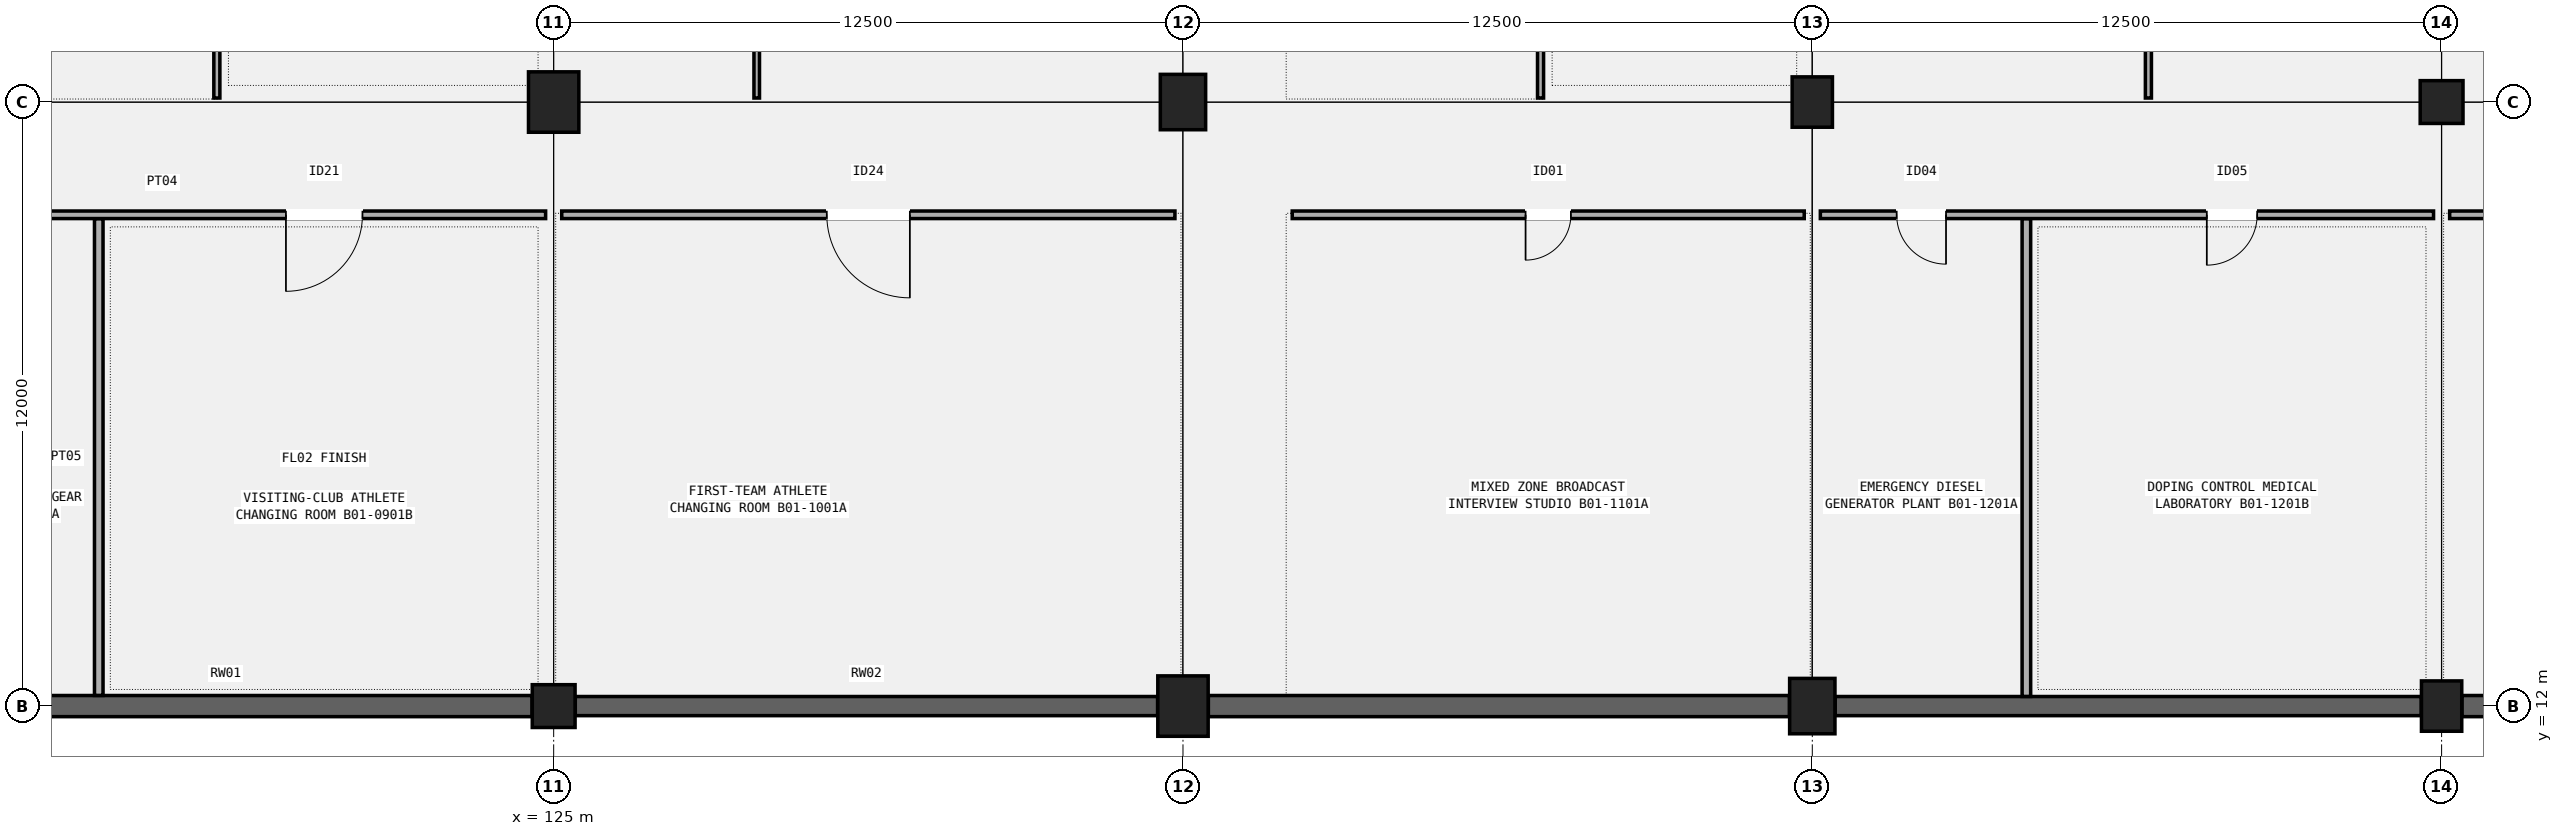
"""IFC4 building model, lengths in metres.
Left out: names, types, materials, properties, quantities, classifications, styles, units other than length and angle.
Written with IfcOpenShell. Run it as: python <this file> out.ifc"""

import sys

from ifc_helpers import new_model, si_unit, direction, frame, frame_2d, origin, origin_2d, place, context, subcontext, project, spatial, rectangle, circle, extrude, element, fill, save


model = new_model("IFC4")
c1 = context("Model", 3, precision=1e-05, world=origin(), true_north=direction((0.0, 1.0)))
c2 = subcontext(c1, "Body", "Model", "MODEL_VIEW")
j1 = project(units=[si_unit("LENGTHUNIT", "METRE"), si_unit("PLANEANGLEUNIT", "RADIAN")], contexts=[c1])
p1 = place(None, origin())
s1 = spatial("IfcSite", under=j1, at=p1, CompositionType="ELEMENT")
p2 = place(p1, origin())
s2 = spatial("IfcBuilding", under=s1, at=p2, CompositionType="ELEMENT")
p3 = place(p2, frame((0.0, 0.0, -4.8)))
s3 = spatial("IfcBuildingStorey", under=s2, at=p3, CompositionType="ELEMENT", Elevation=-4.8)
p4 = place(p3, frame((125.0, 12.0, 0.0), z_axis=(0.0, 0.0, 1.0), x_axis=(1.0, 0.0, 0.0)))
e1 = element("IfcColumn", 1, at=p4, inside=s3, PredefinedType="COLUMN", context=c2, shape_type="SweptSolid", body=[
    extrude(circle(Radius=0.425, at=origin_2d()), origin(), (0.0, 0.0, 1.0), 4.8),
])
for number, where, z_axis, x_axis in (
    (2, (125.0, 24.0, 0.0), (0.0, 0.0, 1.0), (1.0, 0.0, 0.0)),
    (3, (137.5, 12.0, 0.0), (0.0, 0.0, 1.0), (1.0, 0.0, 0.0)),
):
    element("IfcColumn", number, at=place(p3, frame(where, z_axis=z_axis, x_axis=x_axis)), inside=s3, PredefinedType="COLUMN", context=c2, shape_type="SweptSolid", body=[
        extrude(rectangle(XDim=1.0, YDim=1.2, at=origin_2d()), origin(), (0.0, 0.0, 1.0), 4.8),
    ])
for number, where, z_axis, x_axis in (
    (4, (137.5, 24.0, 0.0), (0.0, 0.0, 1.0), (1.0, 0.0, 0.0)),
    (5, (150.0, 12.0, 0.0), (0.0, 0.0, 1.0), (1.0, 0.0, 0.0)),
):
    element("IfcColumn", number, at=place(p3, frame(where, z_axis=z_axis, x_axis=x_axis)), inside=s3, PredefinedType="COLUMN", context=c2, shape_type="SweptSolid", body=[
        extrude(rectangle(XDim=0.9, YDim=1.1, at=origin_2d()), origin(), (0.0, 0.0, 1.0), 4.8),
    ])
for number, where, z_axis, x_axis in (
    (6, (150.0, 24.0, 0.0), (0.0, 0.0, 1.0), (1.0, 0.0, 0.0)),
    (7, (162.5, 12.0, 0.0), (0.0, 0.0, 1.0), (1.0, 0.0, 0.0)),
):
    element("IfcColumn", number, at=place(p3, frame(where, z_axis=z_axis, x_axis=x_axis)), inside=s3, PredefinedType="COLUMN", context=c2, shape_type="SweptSolid", body=[
        extrude(rectangle(XDim=0.8, YDim=1.0, at=origin_2d()), origin(), (0.0, 0.0, 1.0), 4.8),
    ])
p5 = place(p3, frame((162.5, 24.0, 0.0), z_axis=(0.0, 0.0, 1.0), x_axis=(1.0, 0.0, 0.0)))
e8 = element("IfcColumn", 8, at=p5, inside=s3, PredefinedType="COLUMN", context=c2, shape_type="SweptSolid", body=[
    extrude(circle(Radius=0.425, at=origin_2d()), origin(), (0.0, 0.0, 1.0), 4.8),
])
p6 = place(p3, frame((112.404, 12.0, 0.0), z_axis=(0.0, 0.0, 1.0), x_axis=(1.0, 0.0, 0.0)))
e9 = element("IfcWall", 9, at=p6, inside=s3, PredefinedType="STANDARD", context=c2, shape_type="SweptSolid", body=[
    extrude(rectangle(XDim=12.167, YDim=0.42, at=frame_2d((6.083, 0.0))), origin(), (0.0, 0.0, 1.0), 4.46),
])
p7 = place(p3, frame((125.429, 12.0, 0.0), z_axis=(0.0, 0.0, 1.0), x_axis=(1.0, 0.0, 0.0)))
e10 = element("IfcWall", 10, at=p7, inside=s3, PredefinedType="STANDARD", context=c2, shape_type="SweptSolid", body=[
    extrude(rectangle(XDim=11.567, YDim=0.38, at=frame_2d((5.784, 0.0))), origin(), (0.0, 0.0, 1.0), 4.46),
])
p8 = place(p3, frame((138.004, 12.0, 0.0), z_axis=(0.0, 0.0, 1.0), x_axis=(1.0, 0.0, 0.0)))
e11 = element("IfcWall", 11, at=p8, inside=s3, PredefinedType="STANDARD", context=c2, shape_type="SweptSolid", body=[
    extrude(rectangle(XDim=11.542, YDim=0.42, at=frame_2d((5.771, 0.0))), origin(), (0.0, 0.0, 1.0), 4.46),
])
p9 = place(p3, frame((150.454, 12.0, 0.0), z_axis=(0.0, 0.0, 1.0), x_axis=(1.0, 0.0, 0.0)))
e12 = element("IfcWall", 12, at=p9, inside=s3, PredefinedType="STANDARD", context=c2, shape_type="SweptSolid", body=[
    extrude(rectangle(XDim=11.642, YDim=0.38, at=frame_2d((5.821, 0.0))), origin(), (0.0, 0.0, 1.0), 4.46),
])
p10 = place(p3, frame((162.904, 12.0, 0.0), z_axis=(0.0, 0.0, 1.0), x_axis=(1.0, 0.0, 0.0)))
e13 = element("IfcWall", 13, at=p10, inside=s3, PredefinedType="STANDARD", context=c2, shape_type="SweptSolid", body=[
    extrude(rectangle(XDim=11.667, YDim=0.42, at=frame_2d((5.833, 0.0))), origin(), (0.0, 0.0, 1.0), 4.46),
])
p11 = place(p3, frame((112.16, 21.76, 0.0), z_axis=(0.0, 0.0, 1.0), x_axis=(1.0, 0.0, 0.0)))
e14 = element("IfcWall", 14, at=p11, inside=s3, PredefinedType="PARTITIONING", context=c2, shape_type="SweptSolid", body=[
    extrude(rectangle(XDim=12.68, YDim=0.15, at=frame_2d((6.34, 0.0))), origin(), (0.0, 0.0, 1.0), 3.92),
])
p12 = place(p11, frame((2.602, 0.0, 0.0), z_axis=(0.0, 0.0, 1.0), x_axis=(-1.0, 0.0, 0.0)))
e15 = element("IfcOpeningElement", 15, at=p12, cuts=e14, PredefinedType="OPENING", context=c2, shape_type="SweptSolid", body=[
    extrude(rectangle(XDim=1.48, YDim=2.24, at=frame_2d((0.74, 1.12))), frame((0.0, 0.085, 0.0), z_axis=(0.0, -1.0, 0.0), x_axis=(1.0, 0.0, 0.0)), (0.0, 0.0, 1.0), 0.17),
])
p13 = place(p11, frame((9.042, 0.0, 0.0), z_axis=(0.0, 0.0, 1.0), x_axis=(-1.0, 0.0, 0.0)))
e16 = element("IfcOpeningElement", 16, at=p13, cuts=e14, PredefinedType="OPENING", context=c2, shape_type="SweptSolid", body=[
    extrude(rectangle(XDim=1.52, YDim=2.28, at=frame_2d((0.76, 1.14))), frame((0.0, 0.085, 0.0), z_axis=(0.0, -1.0, 0.0), x_axis=(1.0, 0.0, 0.0)), (0.0, 0.0, 1.0), 0.17),
])
p14 = place(p3, frame((115.964, 12.212, 0.0), z_axis=(0.0, 0.0, 1.0), x_axis=(0.0, 1.0, 0.0)))
e17 = element("IfcWall", 17, at=p14, inside=s3, PredefinedType="PARTITIONING", context=c2, shape_type="SweptSolid", body=[
    extrude(rectangle(XDim=9.468, YDim=0.17, at=frame_2d((4.734, 0.0))), origin(), (0.0, 0.0, 1.0), 3.92),
])
p15 = place(p3, frame((118.31, 24.08, 0.0), z_axis=(0.0, 0.0, 1.0), x_axis=(0.0, 1.0, 0.0)))
e18 = element("IfcWall", 18, at=p15, inside=s3, PredefinedType="PARTITIONING", context=c2, shape_type="SweptSolid", body=[
    extrude(rectangle(XDim=9.62, YDim=0.12, at=frame_2d((4.81, 0.0))), origin(), (0.0, 0.0, 1.0), 3.92),
])
p16 = place(p3, frame((125.16, 21.76, 0.0), z_axis=(0.0, 0.0, 1.0), x_axis=(1.0, 0.0, 0.0)))
e19 = element("IfcWall", 19, at=p16, inside=s3, PredefinedType="PARTITIONING", context=c2, shape_type="SweptSolid", body=[
    extrude(rectangle(XDim=12.18, YDim=0.15, at=frame_2d((6.09, 0.0))), origin(), (0.0, 0.0, 1.0), 3.92),
])
p17 = place(p16, frame((6.915, 0.0, 0.0), z_axis=(0.0, 0.0, 1.0), x_axis=(-1.0, 0.0, 0.0)))
e20 = element("IfcOpeningElement", 20, at=p17, cuts=e19, PredefinedType="OPENING", context=c2, shape_type="SweptSolid", body=[
    extrude(rectangle(XDim=1.65, YDim=2.28, at=frame_2d((0.825, 1.14))), frame((0.0, 0.085, 0.0), z_axis=(0.0, -1.0, 0.0), x_axis=(1.0, 0.0, 0.0)), (0.0, 0.0, 1.0), 0.17),
])
p18 = place(p3, frame((129.033, 24.08, 0.0), z_axis=(0.0, 0.0, 1.0), x_axis=(0.0, 1.0, 0.0)))
e21 = element("IfcWall", 21, at=p18, inside=s3, PredefinedType="PARTITIONING", context=c2, shape_type="SweptSolid", body=[
    extrude(rectangle(XDim=9.58, YDim=0.11, at=frame_2d((4.79, 0.0))), origin(), (0.0, 0.0, 1.0), 3.92),
])
p19 = place(p3, frame((139.67, 21.76, 0.0), z_axis=(0.0, 0.0, 1.0), x_axis=(1.0, 0.0, 0.0)))
e22 = element("IfcWall", 22, at=p19, inside=s3, PredefinedType="PARTITIONING", context=c2, shape_type="SweptSolid", body=[
    extrude(rectangle(XDim=10.17, YDim=0.15, at=frame_2d((5.085, 0.0))), origin(), (0.0, 0.0, 1.0), 3.92),
])
p20 = place(p19, frame((5.535, 0.0, 0.0), z_axis=(0.0, 0.0, 1.0), x_axis=(-1.0, 0.0, 0.0)))
e23 = element("IfcOpeningElement", 23, at=p20, cuts=e22, PredefinedType="OPENING", context=c2, shape_type="SweptSolid", body=[
    extrude(rectangle(XDim=0.9, YDim=2.06, at=frame_2d((0.45, 1.03))), frame((0.0, 0.085, 0.0), z_axis=(0.0, -1.0, 0.0), x_axis=(1.0, 0.0, 0.0)), (0.0, 0.0, 1.0), 0.17),
])
p21 = place(p3, frame((144.602, 24.08, 0.0), z_axis=(0.0, 0.0, 1.0), x_axis=(0.0, 1.0, 0.0)))
e24 = element("IfcWall", 24, at=p21, inside=s3, PredefinedType="PARTITIONING", context=c2, shape_type="SweptSolid", body=[
    extrude(rectangle(XDim=9.62, YDim=0.12, at=frame_2d((4.81, 0.0))), origin(), (0.0, 0.0, 1.0), 3.92),
])
p22 = place(p3, frame((150.16, 21.76, 0.0), z_axis=(0.0, 0.0, 1.0), x_axis=(1.0, 0.0, 0.0)))
e25 = element("IfcWall", 25, at=p22, inside=s3, PredefinedType="PARTITIONING", context=c2, shape_type="SweptSolid", body=[
    extrude(rectangle(XDim=12.18, YDim=0.15, at=frame_2d((6.09, 0.0))), origin(), (0.0, 0.0, 1.0), 3.92),
])
p23 = place(p22, frame((2.496, 0.0, 0.0), z_axis=(0.0, 0.0, 1.0), x_axis=(-1.0, 0.0, 0.0)))
e26 = element("IfcOpeningElement", 26, at=p23, cuts=e25, PredefinedType="OPENING", context=c2, shape_type="SweptSolid", body=[
    extrude(rectangle(XDim=0.98, YDim=2.1, at=frame_2d((0.49, 1.05))), frame((0.0, 0.085, 0.0), z_axis=(0.0, -1.0, 0.0), x_axis=(1.0, 0.0, 0.0)), (0.0, 0.0, 1.0), 0.17),
])
p24 = place(p22, frame((8.676, 0.0, 0.0), z_axis=(0.0, 0.0, 1.0), x_axis=(-1.0, 0.0, 0.0)))
e27 = element("IfcOpeningElement", 27, at=p24, cuts=e25, PredefinedType="OPENING", context=c2, shape_type="SweptSolid", body=[
    extrude(rectangle(XDim=1.0, YDim=2.14, at=frame_2d((0.5, 1.07))), frame((0.0, 0.085, 0.0), z_axis=(0.0, -1.0, 0.0), x_axis=(1.0, 0.0, 0.0)), (0.0, 0.0, 1.0), 0.17),
])
p25 = place(p3, frame((154.252, 12.192, 0.0), z_axis=(0.0, 0.0, 1.0), x_axis=(0.0, 1.0, 0.0)))
e28 = element("IfcWall", 28, at=p25, inside=s3, PredefinedType="PARTITIONING", context=c2, shape_type="SweptSolid", body=[
    extrude(rectangle(XDim=9.488, YDim=0.17, at=frame_2d((4.744, 0.0))), origin(), (0.0, 0.0, 1.0), 3.92),
])
p26 = place(p3, frame((156.676, 24.08, 0.0), z_axis=(0.0, 0.0, 1.0), x_axis=(0.0, 1.0, 0.0)))
e29 = element("IfcWall", 29, at=p26, inside=s3, PredefinedType="PARTITIONING", context=c2, shape_type="SweptSolid", body=[
    extrude(rectangle(XDim=9.62, YDim=0.12, at=frame_2d((4.81, 0.0))), origin(), (0.0, 0.0, 1.0), 3.92),
])
p27 = place(p3, frame((162.66, 21.76, 0.0), z_axis=(0.0, 0.0, 1.0), x_axis=(1.0, 0.0, 0.0)))
e30 = element("IfcWall", 30, at=p27, inside=s3, PredefinedType="PARTITIONING", context=c2, shape_type="SweptSolid", body=[
    extrude(rectangle(XDim=12.148, YDim=0.15, at=frame_2d((6.074, 0.0))), origin(), (0.0, 0.0, 1.0), 3.92),
])
p28 = place(p27, frame((6.635, 0.0, 0.0), z_axis=(0.0, 0.0, 1.0), x_axis=(-1.0, 0.0, 0.0)))
e31 = element("IfcOpeningElement", 31, at=p28, cuts=e30, PredefinedType="OPENING", context=c2, shape_type="SweptSolid", body=[
    extrude(rectangle(XDim=1.09, YDim=2.16, at=frame_2d((0.545, 1.08))), frame((0.0, 0.085, 0.0), z_axis=(0.0, -1.0, 0.0), x_axis=(1.0, 0.0, 0.0)), (0.0, 0.0, 1.0), 0.17),
])
p29 = place(p13, origin())
e32 = element("IfcDoor", 32, at=p29, inside=s3, OperationType="SINGLE_SWING_RIGHT", PredefinedType="DOOR", context=c2, shape_type="SweptSolid", body=[
    extrude(rectangle(XDim=1.52, YDim=2.28, at=frame_2d((0.76, 1.14))), frame((0.0, 0.025, 0.0), z_axis=(0.0, -1.0, 0.0), x_axis=(1.0, 0.0, 0.0)), (0.0, 0.0, 1.0), 0.05),
])
fill(e16, e32)
p30 = place(p17, origin())
e33 = element("IfcDoor", 33, at=p30, inside=s3, OperationType="SINGLE_SWING_LEFT", PredefinedType="DOOR", context=c2, shape_type="SweptSolid", body=[
    extrude(rectangle(XDim=1.65, YDim=2.28, at=frame_2d((0.825, 1.14))), frame((0.0, 0.025, 0.0), z_axis=(0.0, -1.0, 0.0), x_axis=(1.0, 0.0, 0.0)), (0.0, 0.0, 1.0), 0.05),
])
fill(e20, e33)
p31 = place(p20, origin())
e34 = element("IfcDoor", 34, at=p31, inside=s3, OperationType="SINGLE_SWING_RIGHT", PredefinedType="DOOR", context=c2, shape_type="SweptSolid", body=[
    extrude(rectangle(XDim=0.9, YDim=2.06, at=frame_2d((0.45, 1.03))), frame((0.0, 0.025, 0.0), z_axis=(0.0, -1.0, 0.0), x_axis=(1.0, 0.0, 0.0)), (0.0, 0.0, 1.0), 0.05),
])
fill(e23, e34)
p32 = place(p23, origin())
e35 = element("IfcDoor", 35, at=p32, inside=s3, OperationType="SINGLE_SWING_LEFT", PredefinedType="DOOR", context=c2, shape_type="SweptSolid", body=[
    extrude(rectangle(XDim=0.98, YDim=2.1, at=frame_2d((0.49, 1.05))), frame((0.0, 0.025, 0.0), z_axis=(0.0, -1.0, 0.0), x_axis=(1.0, 0.0, 0.0)), (0.0, 0.0, 1.0), 0.05),
])
fill(e26, e35)
p33 = place(p24, origin())
e36 = element("IfcDoor", 36, at=p33, inside=s3, OperationType="SINGLE_SWING_RIGHT", PredefinedType="DOOR", context=c2, shape_type="SweptSolid", body=[
    extrude(rectangle(XDim=1.0, YDim=2.14, at=frame_2d((0.5, 1.07))), frame((0.0, 0.025, 0.0), z_axis=(0.0, -1.0, 0.0), x_axis=(1.0, 0.0, 0.0)), (0.0, 0.0, 1.0), 0.05),
])
fill(e27, e36)
save(model, sys.argv[1])
